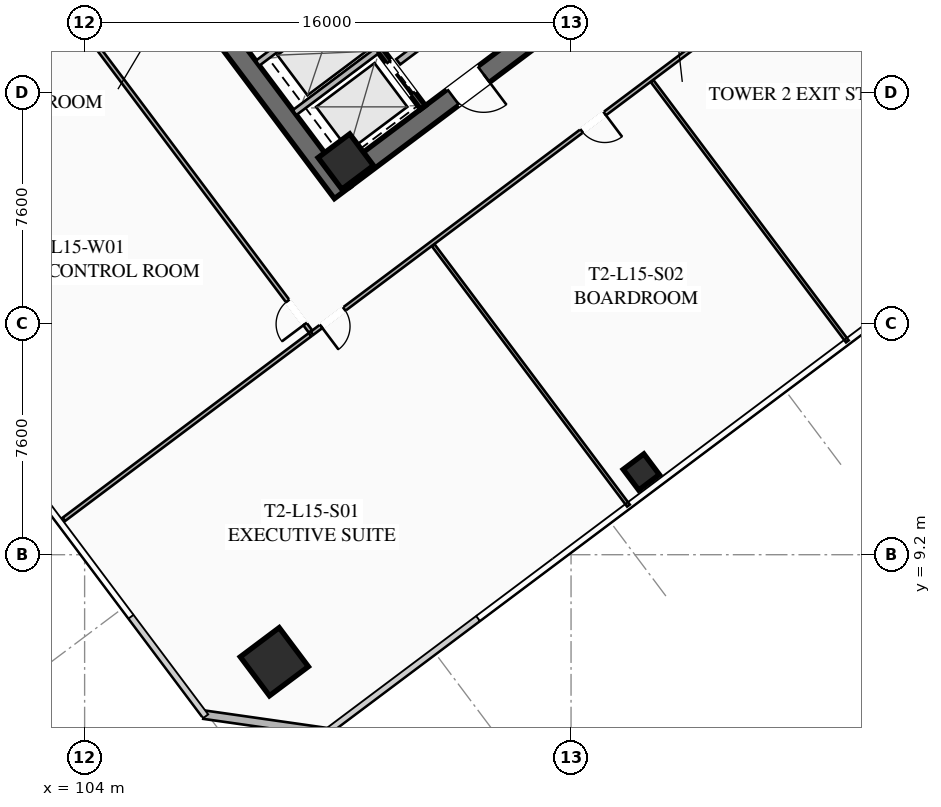
"""IFC4 building model, lengths in metres.
Left out: names, types, materials, properties, quantities, classifications, styles, units other than length and angle.
Written with IfcOpenShell. Run it as: python <this file> out.ifc"""

import sys

from ifc_helpers import new_model, si_unit, direction, frame, frame_2d, origin, origin_2d, place, context, subcontext, project, spatial, rectangle, hollow_rectangle, extrude, element, fill, save


model = new_model("IFC4")
c1 = context("Model", 3, precision=1e-05, world=origin(), true_north=direction((0.0, 1.0)))
c2 = subcontext(c1, "Body", "Model", "MODEL_VIEW")
j1 = project(units=[si_unit("LENGTHUNIT", "METRE"), si_unit("PLANEANGLEUNIT", "RADIAN")], contexts=[c1])
p1 = place(None, origin())
s1 = spatial("IfcSite", under=j1, at=p1, CompositionType="ELEMENT")
p2 = place(p1, origin())
s2 = spatial("IfcBuilding", under=s1, at=p2, CompositionType="ELEMENT")
p3 = place(p2, frame((0.0, 0.0, 60.1)))
s3 = spatial("IfcBuildingStorey", under=s2, at=p3, CompositionType="ELEMENT", Elevation=60.1)
p4 = place(p3, frame((112.476, 21.107, 0.0), z_axis=(0.0, 0.0, 1.0), x_axis=(-0.600005007985, 0.799996243986, 0.0)))
e1 = element("IfcWall", 1, at=p4, inside=s3, PredefinedType="SHEAR", context=c2, shape_type="SweptSolid", body=[
    extrude(rectangle(XDim=15.6, YDim=0.65, at=frame_2d((7.8, 0.0))), origin(), (0.0, 0.0, 1.0), 3.55),
])
p5 = place(p3, frame((124.429, 30.478, 0.0), z_axis=(0.0, 0.0, 1.0), x_axis=(-0.799998028465, -0.600002628705, 0.0)))
e2 = element("IfcWall", 2, at=p5, inside=s3, PredefinedType="SHEAR", context=c2, shape_type="SweptSolid", body=[
    extrude(rectangle(XDim=14.86, YDim=0.65, at=frame_2d((7.43, 0.0))), origin(), (0.0, 0.0, 1.0), 3.55),
])
p6 = place(p5, frame((9.13, 0.0, 0.0)))
e3 = element("IfcOpeningElement", 3, at=p6, cuts=e2, PredefinedType="OPENING", context=c2, shape_type="SweptSolid", body=[
    extrude(rectangle(XDim=1.25, YDim=2.25, at=frame_2d((0.625, 1.125))), frame((0.0, 0.335, 0.0), z_axis=(0.0, -1.0, 0.0), x_axis=(1.0, 0.0, 0.0)), (0.0, 0.0, 1.0), 0.67),
])
p7 = place(p5, frame((4.08, 0.0, 0.0)))
e4 = element("IfcOpeningElement", 4, at=p7, cuts=e2, PredefinedType="OPENING", context=c2, shape_type="SweptSolid", body=[
    extrude(rectangle(XDim=1.25, YDim=2.25, at=frame_2d((0.625, 1.125))), frame((0.0, 0.335, 0.0), z_axis=(0.0, -1.0, 0.0), x_axis=(1.0, 0.0, 0.0)), (0.0, 0.0, 1.0), 0.67),
])
p8 = place(p3, frame((112.59, 22.13, 0.0), z_axis=(0.0, 0.0, 1.0), x_axis=(0.799999996291, 0.600000004945, 0.0)))
e5 = element("IfcColumn", 5, at=p8, inside=s3, PredefinedType="COLUMN", context=c2, shape_type="SweptSolid", body=[
    extrude(hollow_rectangle(XDim=1.3, YDim=1.3, WallThickness=0.05, at=origin_2d()), origin(), (0.0, 0.0, 1.0), 3.35),
])
p9 = place(p3, frame((110.24, 5.68, 0.0), z_axis=(0.0, 0.0, 1.0), x_axis=(0.799999996291, 0.600000004945, 0.0)))
e6 = element("IfcColumn", 6, at=p9, inside=s3, PredefinedType="COLUMN", context=c2, shape_type="SweptSolid", body=[
    extrude(hollow_rectangle(XDim=1.6, YDim=1.6, WallThickness=0.06, at=origin_2d()), origin(), (0.0, 0.0, 1.0), 3.35),
])
p10 = place(p3, frame((122.31, 11.92, 0.0), z_axis=(0.0, 0.0, 1.0), x_axis=(0.799999996291, 0.600000004945, 0.0)))
e7 = element("IfcColumn", 7, at=p10, inside=s3, PredefinedType="COLUMN", context=c2, shape_type="SweptSolid", body=[
    extrude(hollow_rectangle(XDim=0.85, YDim=0.85, WallThickness=0.035, at=origin_2d()), origin(), (0.0, 0.0, 1.0), 3.35),
])
p11 = place(p3, frame((111.98, 3.36, 0.0), z_axis=(0.0, 0.0, 1.0), x_axis=(-0.989955445613, 0.14137968631, 0.0)))
e8 = element("IfcWall", 8, at=p11, inside=s3, PredefinedType="SOLIDWALL", context=c2, shape_type="SweptSolid", body=[
    extrude(rectangle(XDim=4.101, YDim=0.28, at=frame_2d((2.051, 0.0))), origin(), (0.0, 0.0, 1.0), 3.35),
])
p12 = place(p3, frame((114.316, 25.412, 0.0), z_axis=(0.0, 0.0, 1.0), x_axis=(0.800018601094, 0.59997519774, 0.0)))
e9 = element("IfcWall", 9, at=p12, inside=s3, PredefinedType="SOLIDWALL", context=c2, shape_type="SweptSolid", body=[
    extrude(rectangle(XDim=3.15, YDim=0.22, at=frame_2d((1.575, 0.0))), origin(), (0.0, 0.0, 1.0), 2.703),
])
p13 = place(p12, frame((0.95, 0.0, 0.0)))
e10 = element("IfcOpeningElement", 10, at=p13, cuts=e9, PredefinedType="OPENING", context=c2, shape_type="SweptSolid", body=[
    extrude(rectangle(XDim=1.25, YDim=2.25, at=frame_2d((0.625, 1.125))), frame((0.0, 0.12, 0.0), z_axis=(0.0, -1.0, 0.0), x_axis=(1.0, 0.0, 0.0)), (0.0, 0.0, 1.0), 0.24),
])
p14 = place(p3, frame((115.13, 23.91, 0.0), z_axis=(0.0, 0.0, 1.0), x_axis=(-0.599975393228, 0.800018454488, 0.0)))
e11 = element("IfcWall", 11, at=p14, inside=s3, PredefinedType="SHEAR", context=c2, shape_type="SweptSolid", body=[
    extrude(rectangle(XDim=6.35, YDim=0.2, at=frame_2d((3.175, 0.0))), origin(), (0.0, 0.0, 1.0), 3.35),
])
p15 = place(p14, frame((4.775, 0.0, 0.0)))
e12 = element("IfcOpeningElement", 12, at=p15, cuts=e11, PredefinedType="OPENING", context=c2, shape_type="SweptSolid", body=[
    extrude(rectangle(XDim=1.3, YDim=2.25, at=frame_2d((0.65, 1.125))), frame((0.0, 0.11, 0.0), z_axis=(0.0, -1.0, 0.0), x_axis=(1.0, 0.0, 0.0)), (0.0, 0.0, 1.0), 0.22),
])
p16 = place(p14, frame((2.775, 0.0, 0.0)))
e13 = element("IfcOpeningElement", 13, at=p16, cuts=e11, PredefinedType="OPENING", context=c2, shape_type="SweptSolid", body=[
    extrude(rectangle(XDim=1.3, YDim=2.25, at=frame_2d((0.65, 1.125))), frame((0.0, 0.11, 0.0), z_axis=(0.0, -1.0, 0.0), x_axis=(1.0, 0.0, 0.0)), (0.0, 0.0, 1.0), 0.22),
])
p17 = place(p14, frame((0.575, 0.0, 0.0)))
e14 = element("IfcOpeningElement", 14, at=p17, cuts=e11, PredefinedType="OPENING", context=c2, shape_type="SweptSolid", body=[
    extrude(rectangle(XDim=1.3, YDim=2.25, at=frame_2d((0.65, 1.125))), frame((0.0, 0.11, 0.0), z_axis=(0.0, -1.0, 0.0), x_axis=(1.0, 0.0, 0.0)), (0.0, 0.0, 1.0), 0.22),
])
for number, where, z_axis, x_axis in (
    (15, (110.906, 23.742, 0.0), (0.0, 0.0, 1.0), (0.8, 0.6, 0.0)),
    (16, (109.688, 25.366, 0.0), (0.0, 0.0, 1.0), (0.8, 0.6, 0.0)),
):
    element("IfcWall", number, at=place(p3, frame(where, z_axis=z_axis, x_axis=x_axis)), inside=s3, PredefinedType="SOLIDWALL", context=c2, shape_type="SweptSolid", body=[
        extrude(rectangle(XDim=3.38, YDim=0.2, at=frame_2d((1.69, 0.0))), origin(), (0.0, 0.0, 1.0), 3.35),
    ])
p18 = place(p3, frame((135.46, 34.47, 0.0), z_axis=(0.0, 0.0, 1.0), x_axis=(-0.799998045563, -0.600002605907, 0.0)))
e17 = element("IfcWall", 17, at=p18, inside=s3, PredefinedType="PARTITIONING", context=c2, shape_type="SweptSolid", body=[
    extrude(rectangle(XDim=29.98, YDim=0.135, at=frame_2d((14.99, 0.0))), origin(), (0.0, 0.0, 1.0), 2.703),
])
p19 = place(p18, frame((28.65, 0.0, 0.0)))
e18 = element("IfcOpeningElement", 18, at=p19, cuts=e17, PredefinedType="OPENING", context=c2, shape_type="SweptSolid", body=[
    extrude(rectangle(XDim=0.95, YDim=2.05, at=frame_2d((0.475, 1.025))), frame((0.0, 0.077, 0.0), z_axis=(0.0, -1.0, 0.0), x_axis=(1.0, 0.0, 0.0)), (0.0, 0.0, 1.0), 0.155),
])
p20 = place(p18, frame((17.938, 0.0, 0.0)))
e19 = element("IfcOpeningElement", 19, at=p20, cuts=e17, PredefinedType="OPENING", context=c2, shape_type="SweptSolid", body=[
    extrude(rectangle(XDim=0.95, YDim=2.05, at=frame_2d((0.475, 1.025))), frame((0.0, 0.077, 0.0), z_axis=(0.0, -1.0, 0.0), x_axis=(1.0, 0.0, 0.0)), (0.0, 0.0, 1.0), 0.155),
])
p21 = place(p18, frame((0.38, 0.0, 0.0)))
e20 = element("IfcOpeningElement", 20, at=p21, cuts=e17, PredefinedType="OPENING", context=c2, shape_type="SweptSolid", body=[
    extrude(rectangle(XDim=0.95, YDim=2.05, at=frame_2d((0.475, 1.025))), frame((0.0, 0.077, 0.0), z_axis=(0.0, -1.0, 0.0), x_axis=(1.0, 0.0, 0.0)), (0.0, 0.0, 1.0), 0.155),
])
p22 = place(p3, frame((121.888, 10.816, 0.0), z_axis=(0.0, 0.0, 1.0), x_axis=(-0.599992698573, 0.800005476018, 0.0)))
e21 = element("IfcWall", 21, at=p22, inside=s3, PredefinedType="PARTITIONING", context=c2, shape_type="SweptSolid", body=[
    extrude(rectangle(XDim=10.7, YDim=0.11, at=frame_2d((5.35, 0.0))), origin(), (0.0, 0.0, 1.0), 2.703),
])
p23 = place(p3, frame((129.088, 16.216, 0.0), z_axis=(0.0, 0.0, 1.0), x_axis=(-0.600003650761, 0.799997261916, 0.0)))
e22 = element("IfcWall", 22, at=p23, inside=s3, PredefinedType="PARTITIONING", context=c2, shape_type="SweptSolid", body=[
    extrude(rectangle(XDim=10.7, YDim=0.11, at=frame_2d((5.35, 0.0))), origin(), (0.0, 0.0, 1.0), 2.703),
])
p24 = place(p3, frame((111.428, 16.546, 0.0), z_axis=(0.0, 0.0, 1.0), x_axis=(-0.599996389772, 0.800002707659, 0.0)))
e23 = element("IfcWall", 23, at=p24, inside=s3, PredefinedType="PARTITIONING", context=c2, shape_type="SweptSolid", body=[
    extrude(rectangle(XDim=21.64, YDim=0.135, at=frame_2d((10.82, 0.0))), origin(), (0.0, 0.0, 1.0), 2.703),
])
p25 = place(p24, frame((0.3, 0.0, 0.0)))
e24 = element("IfcOpeningElement", 24, at=p25, cuts=e23, PredefinedType="OPENING", context=c2, shape_type="SweptSolid", body=[
    extrude(rectangle(XDim=0.95, YDim=2.05, at=frame_2d((0.475, 1.025))), frame((0.0, 0.077, 0.0), z_axis=(0.0, -1.0, 0.0), x_axis=(1.0, 0.0, 0.0)), (0.0, 0.0, 1.0), 0.155),
])
p26 = place(p3, frame((103.316, 10.362, 0.0), z_axis=(0.0, 0.0, 1.0), x_axis=(0.800005789764, 0.599992280237, 0.0)))
e25 = element("IfcWall", 25, at=p26, inside=s3, PredefinedType="PARTITIONING", context=c2, shape_type="SweptSolid", body=[
    extrude(rectangle(XDim=10.12, YDim=0.135, at=frame_2d((5.06, 0.0))), origin(), (0.0, 0.0, 1.0), 2.703),
])
p27 = place(p6, origin())
e26 = element("IfcDoor", 26, at=p27, inside=s3, OperationType="SINGLE_SWING_LEFT", PredefinedType="DOOR", context=c2, shape_type="SweptSolid", body=[
    extrude(rectangle(XDim=1.25, YDim=2.25, at=frame_2d((0.625, 1.125))), frame((0.0, 0.025, 0.0), z_axis=(0.0, -1.0, 0.0), x_axis=(1.0, 0.0, 0.0)), (0.0, 0.0, 1.0), 0.05),
])
fill(e3, e26)
p28 = place(p19, origin())
e27 = element("IfcDoor", 27, at=p28, inside=s3, OperationType="SINGLE_SWING_RIGHT", PredefinedType="DOOR", context=c2, shape_type="SweptSolid", body=[
    extrude(rectangle(XDim=0.95, YDim=2.05, at=frame_2d((0.475, 1.025))), frame((0.0, 0.025, 0.0), z_axis=(0.0, -1.0, 0.0), x_axis=(1.0, 0.0, 0.0)), (0.0, 0.0, 1.0), 0.05),
])
fill(e18, e27)
p29 = place(p20, origin())
e28 = element("IfcDoor", 28, at=p29, inside=s3, OperationType="SINGLE_SWING_LEFT", PredefinedType="DOOR", context=c2, shape_type="SweptSolid", body=[
    extrude(rectangle(XDim=0.95, YDim=2.05, at=frame_2d((0.475, 1.025))), frame((0.0, 0.025, 0.0), z_axis=(0.0, -1.0, 0.0), x_axis=(1.0, 0.0, 0.0)), (0.0, 0.0, 1.0), 0.05),
])
fill(e19, e28)
p30 = place(p25, origin())
e29 = element("IfcDoor", 29, at=p30, inside=s3, OperationType="SINGLE_SWING_LEFT", PredefinedType="DOOR", context=c2, shape_type="SweptSolid", body=[
    extrude(rectangle(XDim=0.95, YDim=2.05, at=frame_2d((0.475, 1.025))), frame((0.0, 0.025, 0.0), z_axis=(0.0, -1.0, 0.0), x_axis=(1.0, 0.0, 0.0)), (0.0, 0.0, 1.0), 0.05),
])
fill(e24, e29)
p31 = place(p17, origin())
e30 = element("IfcDoor", 30, at=p31, inside=s3, OperationType="SLIDING_TO_LEFT", PredefinedType="DOOR", context=c2, shape_type="SweptSolid", body=[
    extrude(rectangle(XDim=1.3, YDim=2.25, at=frame_2d((0.65, 1.125))), frame((0.0, 0.025, 0.0), z_axis=(0.0, -1.0, 0.0), x_axis=(1.0, 0.0, 0.0)), (0.0, 0.0, 1.0), 0.05),
])
fill(e14, e30)
save(model, sys.argv[1])
